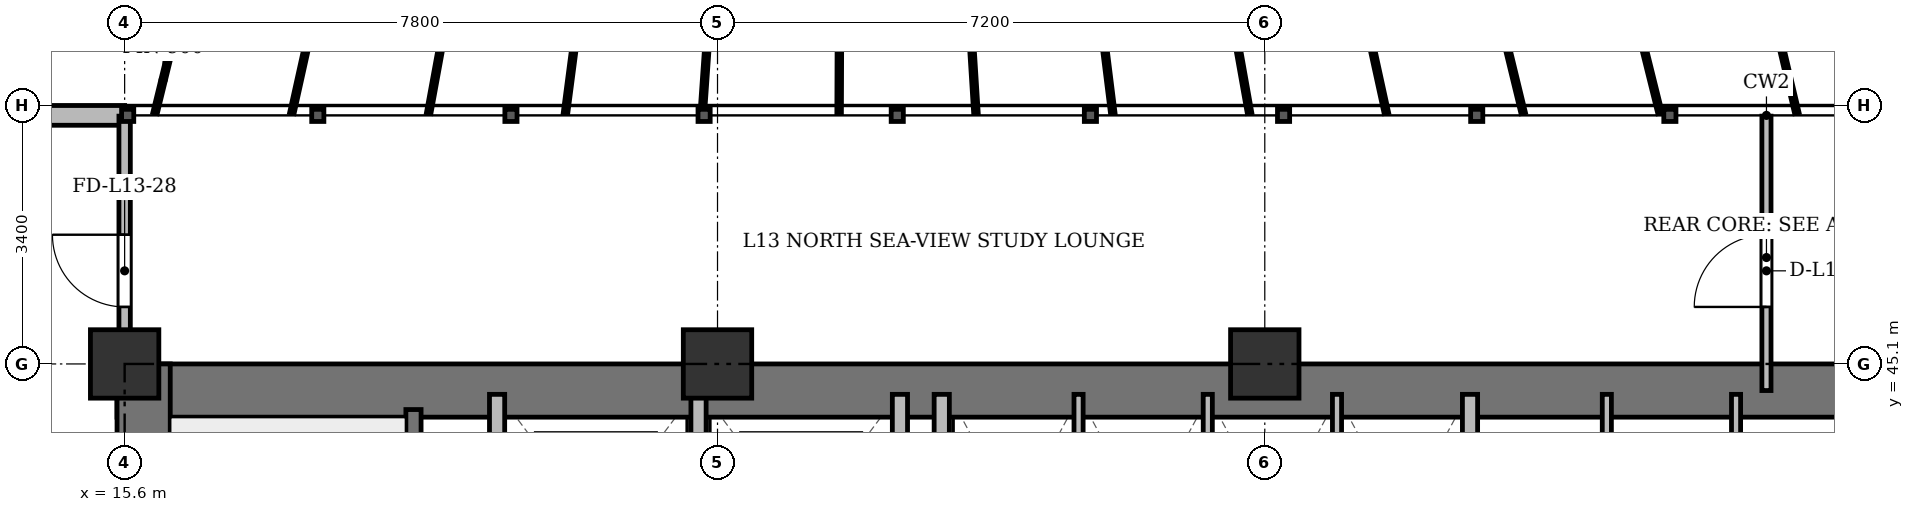
"""IFC4 building model, lengths in metres.
Left out: names, types, materials, properties, quantities, classifications, styles, units other than length and angle.
Written with IfcOpenShell. Run it as: python <this file> out.ifc"""

import sys

from ifc_helpers import new_model, si_unit, direction, frame, frame_2d, origin, origin_2d, place, context, subcontext, project, spatial, rectangle, extrude, source, transform, mapped, element, fill, save


model = new_model("IFC4")
c1 = context("Model", 3, precision=1e-05, world=origin(), true_north=direction((0.0, 1.0)))
c2 = subcontext(c1, "Body", "Model", "MODEL_VIEW")
j1 = project(units=[si_unit("LENGTHUNIT", "METRE"), si_unit("PLANEANGLEUNIT", "RADIAN")], contexts=[c1])
p1 = place(None, origin())
s1 = spatial("IfcSite", under=j1, at=p1, CompositionType="ELEMENT")
p2 = place(p1, origin())
s2 = spatial("IfcBuilding", under=s1, at=p2, CompositionType="ELEMENT")
p3 = place(p2, frame((0.0, 0.0, 52.3)))
s3 = spatial("IfcBuildingStorey", under=s2, at=p3, CompositionType="ELEMENT", Elevation=52.3)
m1 = source(origin(), c2, "Body", "SweptSolid", [
    extrude(rectangle(XDim=0.9, YDim=0.9, at=origin_2d()), origin(), (0.0, 0.0, 1.0), 3.6),
])
for number, where, z_axis, x_axis in (
    (1, (15.6, 45.1, 0.0), (0.0, 0.0, 1.0), (1.0, 0.0, 0.0)),
    (2, (23.4, 45.1, 0.0), (0.0, 0.0, 1.0), (1.0, 0.0, 0.0)),
    (3, (30.6, 45.1, 0.0), (0.0, 0.0, 1.0), (1.0, 0.0, 0.0)),
):
    element("IfcColumn", number, at=place(p3, frame(where, z_axis=z_axis, x_axis=x_axis)), inside=s3, PredefinedType="COLUMN", context=c2, shape_type="MappedRepresentation", body=[
        mapped(m1, transform((0.0, 0.0, 0.0), x_axis=(1.0, 0.0, 0.0), y_axis=(0.0, 1.0, 0.0), z_axis=(0.0, 0.0, 1.0), scale=1.0)),
    ])
p4 = place(p3, frame((7.6, 48.37, 0.0), z_axis=(0.0, 0.0, 1.0), x_axis=(1.0, 0.0, 0.0)))
e4 = element("IfcWall", 4, at=p4, inside=s3, PredefinedType="SOLIDWALL", context=c2, shape_type="SweptSolid", body=[
    extrude(rectangle(XDim=8.0, YDim=0.26, at=frame_2d((4.0, 0.0))), origin(), (0.0, 0.0, 1.0), 3.34),
])
p5 = place(p4, frame((3.325, 0.0, 0.9)))
e5 = element("IfcOpeningElement", 5, at=p5, cuts=e4, PredefinedType="OPENING", context=c2, shape_type="SweptSolid", body=[
    extrude(rectangle(XDim=1.35, YDim=1.5, at=frame_2d((0.675, 0.75))), frame((0.0, 0.14, 0.0), z_axis=(0.0, -1.0, 0.0), x_axis=(1.0, 0.0, 0.0)), (0.0, 0.0, 1.0), 0.28),
])
p6 = place(p3, frame((15.5, 44.75, 0.0), z_axis=(0.0, 0.0, 1.0), x_axis=(1.0, 0.0, 0.0)))
e6 = element("IfcWall", 6, at=p6, inside=s3, PredefinedType="SHEAR", context=c2, shape_type="SweptSolid", body=[
    extrude(rectangle(XDim=43.4, YDim=0.7, at=frame_2d((21.7, 0.0))), origin(), (0.0, 0.0, 1.0), 3.34),
])
p7 = place(p3, frame((15.85, 33.4, 0.0), z_axis=(0.0, 0.0, 1.0), x_axis=(0.0, 1.0, 0.0)))
e7 = element("IfcWall", 7, at=p7, inside=s3, PredefinedType="SHEAR", context=c2, shape_type="SweptSolid", body=[
    extrude(rectangle(XDim=11.7, YDim=0.7, at=frame_2d((5.85, 0.0))), origin(), (0.0, 0.0, 1.0), 3.34),
])
p8 = place(p3, frame((19.4, 33.4, 0.0), z_axis=(0.0, 0.0, 1.0), x_axis=(0.0, 1.0, 0.0)))
e8 = element("IfcWall", 8, at=p8, inside=s3, PredefinedType="SHEAR", context=c2, shape_type="SweptSolid", body=[
    extrude(rectangle(XDim=11.1, YDim=0.2, at=frame_2d((5.55, 0.0))), origin(), (0.0, 0.0, 1.0), 3.34),
])
p9 = place(p8, frame((0.85, 0.0, 0.0)))
e9 = element("IfcOpeningElement", 9, at=p9, cuts=e8, PredefinedType="OPENING", context=c2, shape_type="SweptSolid", body=[
    extrude(rectangle(XDim=1.1, YDim=2.15, at=frame_2d((0.55, 1.075))), frame((0.0, 0.11, 0.0), z_axis=(0.0, -1.0, 0.0), x_axis=(1.0, 0.0, 0.0)), (0.0, 0.0, 1.0), 0.22),
])
for number, where, z_axis, x_axis in (
    (10, (20.5, 41.3, 0.0), (0.0, 0.0, 1.0), (0.0, 1.0, 0.0)),
    (11, (23.15, 41.3, 0.0), (0.0, 0.0, 1.0), (0.0, 1.0, 0.0)),
    (12, (25.8, 41.3, 0.0), (0.0, 0.0, 1.0), (0.0, 1.0, 0.0)),
):
    element("IfcWall", number, at=place(p3, frame(where, z_axis=z_axis, x_axis=x_axis)), inside=s3, PredefinedType="SOLIDWALL", context=c2, shape_type="SweptSolid", body=[
        extrude(rectangle(XDim=3.4, YDim=0.2, at=frame_2d((1.7, 0.0))), origin(), (0.0, 0.0, 1.0), 3.34),
    ])
p10 = place(p3, frame((26.35, 33.4, 0.0), z_axis=(0.0, 0.0, 1.0), x_axis=(0.0, 1.0, 0.0)))
e13 = element("IfcWall", 13, at=p10, inside=s3, PredefinedType="SOLIDWALL", context=c2, shape_type="SweptSolid", body=[
    extrude(rectangle(XDim=11.3, YDim=0.2, at=frame_2d((5.65, 0.0))), origin(), (0.0, 0.0, 1.0), 2.69),
])
p11 = place(p3, frame((33.3, 41.5, 0.0), z_axis=(0.0, 0.0, 1.0), x_axis=(0.0, 1.0, 0.0)))
e14 = element("IfcWall", 14, at=p11, inside=s3, PredefinedType="SOLIDWALL", context=c2, shape_type="SweptSolid", body=[
    extrude(rectangle(XDim=3.2, YDim=0.2, at=frame_2d((1.6, 0.0))), origin(), (0.0, 0.0, 1.0), 3.34),
])
for number, where, z_axis, x_axis in (
    (15, (28.15, 41.5, 0.0), (0.0, 0.0, 1.0), (0.0, 1.0, 0.0)),
    (16, (29.85, 41.5, 0.0), (0.0, 0.0, 1.0), (0.0, 1.0, 0.0)),
    (17, (31.55, 41.5, 0.0), (0.0, 0.0, 1.0), (0.0, 1.0, 0.0)),
    (18, (35.1, 41.5, 0.0), (0.0, 0.0, 1.0), (0.0, 1.0, 0.0)),
    (19, (36.8, 41.5, 0.0), (0.0, 0.0, 1.0), (0.0, 1.0, 0.0)),
):
    element("IfcWall", number, at=place(p3, frame(where, z_axis=z_axis, x_axis=x_axis)), inside=s3, PredefinedType="PARTITIONING", context=c2, shape_type="SweptSolid", body=[
        extrude(rectangle(XDim=3.2, YDim=0.12, at=frame_2d((1.6, 0.0))), origin(), (0.0, 0.0, 1.0), 3.34),
    ])
p12 = place(p3, frame((37.2, 44.75, 0.0), z_axis=(0.0, 0.0, 1.0), x_axis=(0.0, 1.0, 0.0)))
e20 = element("IfcWall", 20, at=p12, inside=s3, PredefinedType="PARTITIONING", context=c2, shape_type="SweptSolid", body=[
    extrude(rectangle(XDim=3.61, YDim=0.12, at=frame_2d((1.805, 0.0))), origin(), (0.0, 0.0, 1.0), 2.69),
])
p13 = place(p12, frame((1.1, 0.0, 0.0)))
e21 = element("IfcOpeningElement", 21, at=p13, cuts=e20, PredefinedType="OPENING", context=c2, shape_type="SweptSolid", body=[
    extrude(rectangle(XDim=0.95, YDim=2.15, at=frame_2d((0.475, 1.075))), frame((0.0, 0.07, 0.0), z_axis=(0.0, -1.0, 0.0), x_axis=(1.0, 0.0, 0.0)), (0.0, 0.0, 1.0), 0.14),
])
p14 = place(p3, frame((15.6, 44.75, 0.0), z_axis=(0.0, 0.0, 1.0), x_axis=(0.0, 1.0, 0.0)))
e22 = element("IfcWall", 22, at=p14, inside=s3, PredefinedType="PARTITIONING", context=c2, shape_type="SweptSolid", body=[
    extrude(rectangle(XDim=3.61, YDim=0.15, at=frame_2d((1.805, 0.0))), origin(), (0.0, 0.0, 1.0), 2.752),
])
p15 = place(p14, frame((1.1, 0.0, 0.0)))
e23 = element("IfcOpeningElement", 23, at=p15, cuts=e22, PredefinedType="OPENING", context=c2, shape_type="SweptSolid", body=[
    extrude(rectangle(XDim=0.95, YDim=2.15, at=frame_2d((0.475, 1.075))), frame((0.0, 0.085, 0.0), z_axis=(0.0, -1.0, 0.0), x_axis=(1.0, 0.0, 0.0)), (0.0, 0.0, 1.0), 0.17),
])
m2 = source(origin(), c2, "Body", "SweptSolid", [
    extrude(rectangle(XDim=0.95, YDim=2.15, at=frame_2d((0.475, 1.075))), frame((0.0, 0.025, 0.0), z_axis=(0.0, -1.0, 0.0), x_axis=(1.0, 0.0, 0.0)), (0.0, 0.0, 1.0), 0.05),
])
p16 = place(p13, origin())
e24 = element("IfcDoor", 24, at=p16, inside=s3, OperationType="SINGLE_SWING_LEFT", PredefinedType="DOOR", context=c2, shape_type="MappedRepresentation", body=[
    mapped(m2, transform((0.0, 0.0, 0.0), x_axis=(1.0, 0.0, 0.0), y_axis=(0.0, 1.0, 0.0), z_axis=(0.0, 0.0, 1.0), scale=1.0)),
])
fill(e21, e24)
p17 = place(p15, origin())
e25 = element("IfcDoor", 25, at=p17, inside=s3, OperationType="SINGLE_SWING_RIGHT", PredefinedType="DOOR", context=c2, shape_type="MappedRepresentation", body=[
    mapped(m2, transform((0.0, 0.0, 0.0), x_axis=(1.0, 0.0, 0.0), y_axis=(0.0, 1.0, 0.0), z_axis=(0.0, 0.0, 1.0), scale=1.0)),
])
fill(e23, e25)
save(model, sys.argv[1])
